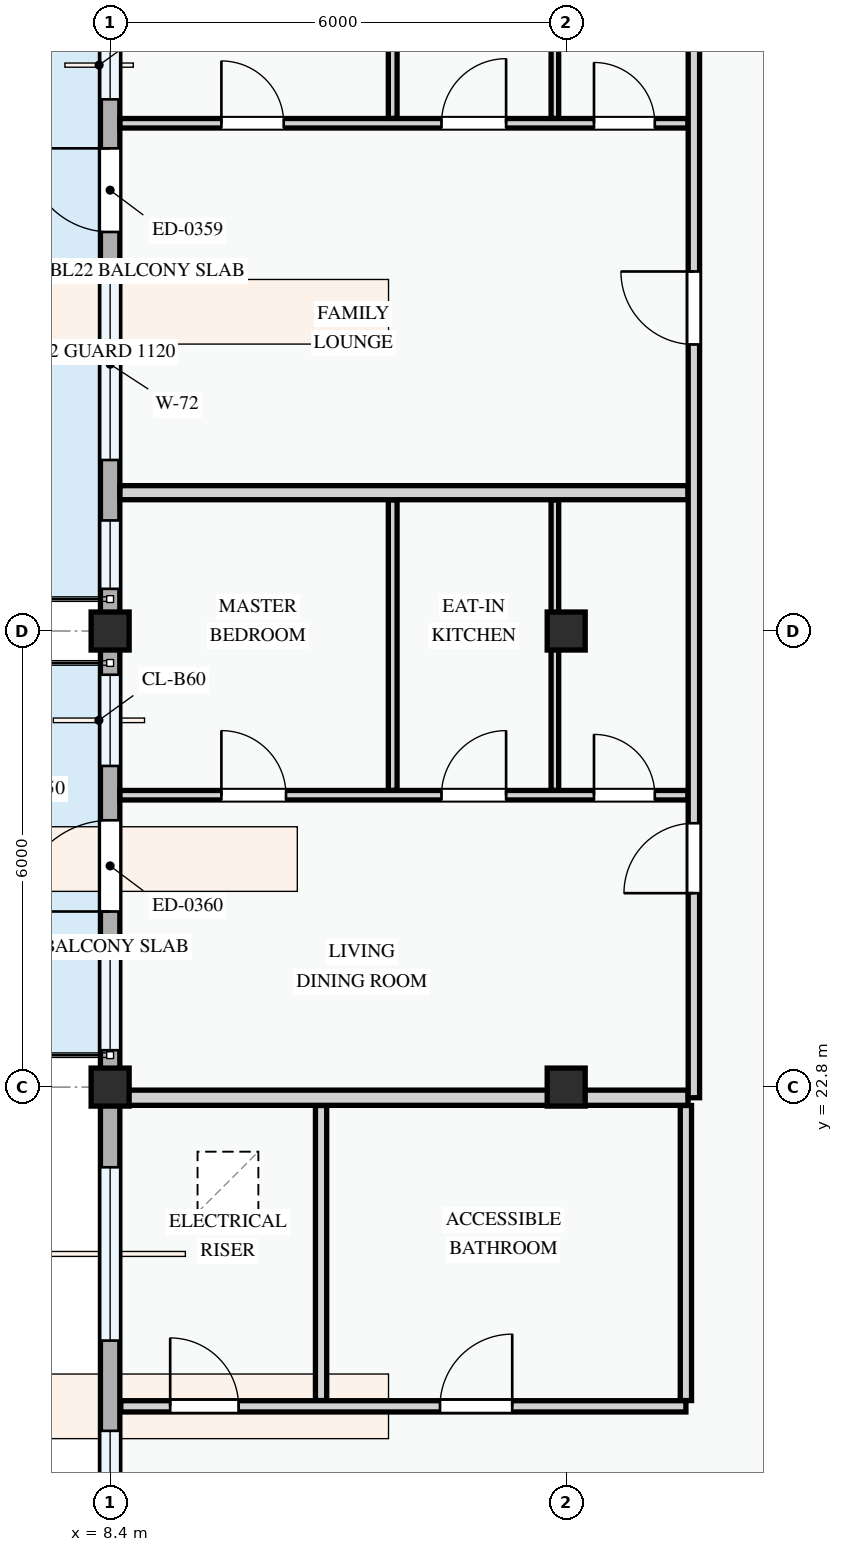
"""IFC4 building model, lengths in metres.
Left out: names, types, materials, properties, quantities, classifications, styles, units other than length and angle.
Written with IfcOpenShell. Run it as: python <this file> out.ifc"""

import sys

from ifc_helpers import new_model, si_unit, direction, frame, frame_2d, origin, origin_2d, place, context, subcontext, project, spatial, rectangle, extrude, element, fill, save


model = new_model("IFC4")
c1 = context("Model", 3, precision=1e-05, world=origin(), true_north=direction((0.0, 1.0)))
c2 = subcontext(c1, "Body", "Model", "MODEL_VIEW")
j1 = project(units=[si_unit("LENGTHUNIT", "METRE"), si_unit("PLANEANGLEUNIT", "RADIAN")], contexts=[c1])
p1 = place(None, origin())
s1 = spatial("IfcSite", under=j1, at=p1, CompositionType="ELEMENT")
p2 = place(p1, origin())
s2 = spatial("IfcBuilding", under=s1, at=p2, CompositionType="ELEMENT")
p3 = place(p2, frame((0.0, 0.0, 31.2)))
s3 = spatial("IfcBuildingStorey", under=s2, at=p3, CompositionType="ELEMENT", Elevation=31.2)
for number, where, z_axis, x_axis in (
    (1, (8.4, 22.8, 0.0), (0.0, 0.0, 1.0), (1.0, 0.0, 0.0)),
    (2, (8.4, 28.8, 0.0), (0.0, 0.0, 1.0), (1.0, 0.0, 0.0)),
    (3, (14.4, 22.8, 0.0), (0.0, 0.0, 1.0), (1.0, 0.0, 0.0)),
    (4, (14.4, 28.8, 0.0), (0.0, 0.0, 1.0), (1.0, 0.0, 0.0)),
):
    element("IfcColumn", number, at=place(p3, frame(where, z_axis=z_axis, x_axis=x_axis)), inside=s3, PredefinedType="COLUMN", context=c2, shape_type="SweptSolid", body=[
        extrude(rectangle(XDim=0.5, YDim=0.5, at=origin_2d()), origin(), (0.0, 0.0, 1.0), 3.3),
    ])
p4 = place(p3, frame((8.4, 37.2, 0.0), z_axis=(0.0, 0.0, 1.0), x_axis=(0.0, -1.0, 0.0)))
e5 = element("IfcWall", 5, at=p4, inside=s3, PredefinedType="STANDARD", context=c2, shape_type="SweptSolid", body=[
    extrude(rectangle(XDim=8.4, YDim=0.255, at=frame_2d((4.2, 0.0))), origin(), (0.0, 0.0, 1.0), 2.425),
])
p5 = place(p4, frame((2.05, 0.0, 0.0)))
e6 = element("IfcOpeningElement", 6, at=p5, cuts=e5, PredefinedType="OPENING", context=c2, shape_type="SweptSolid", body=[
    extrude(rectangle(XDim=1.1, YDim=2.15, at=frame_2d((0.55, 1.075))), frame((0.0, 0.137, 0.0), z_axis=(0.0, -1.0, 0.0), x_axis=(1.0, 0.0, 0.0)), (0.0, 0.0, 1.0), 0.275),
])
p6 = place(p4, frame((0.505, 0.0, 0.78)))
e7 = element("IfcOpeningElement", 7, at=p6, cuts=e5, PredefinedType="OPENING", context=c2, shape_type="SweptSolid", body=[
    extrude(rectangle(XDim=0.9, YDim=1.2, at=frame_2d((0.45, 0.6))), frame((0.0, 0.137, 0.0), z_axis=(0.0, -1.0, 0.0), x_axis=(1.0, 0.0, 0.0)), (0.0, 0.0, 1.0), 0.275),
])
p7 = place(p4, frame((3.63, 0.0, 0.78)))
e8 = element("IfcOpeningElement", 8, at=p7, cuts=e5, PredefinedType="OPENING", context=c2, shape_type="SweptSolid", body=[
    extrude(rectangle(XDim=2.52, YDim=1.5, at=frame_2d((1.26, 0.75))), frame((0.0, 0.137, 0.0), z_axis=(0.0, -1.0, 0.0), x_axis=(1.0, 0.0, 0.0)), (0.0, 0.0, 1.0), 0.275),
])
p8 = place(p4, frame((6.945, 0.0, 0.78)))
e9 = element("IfcOpeningElement", 9, at=p8, cuts=e5, PredefinedType="OPENING", context=c2, shape_type="SweptSolid", body=[
    extrude(rectangle(XDim=0.9, YDim=1.2, at=frame_2d((0.45, 0.6))), frame((0.0, 0.137, 0.0), z_axis=(0.0, -1.0, 0.0), x_axis=(1.0, 0.0, 0.0)), (0.0, 0.0, 1.0), 0.275),
])
p9 = place(p3, frame((8.4, 28.8, 0.0), z_axis=(0.0, 0.0, 1.0), x_axis=(0.0, -1.0, 0.0)))
e10 = element("IfcWall", 10, at=p9, inside=s3, PredefinedType="STANDARD", context=c2, shape_type="SweptSolid", body=[
    extrude(rectangle(XDim=6.0, YDim=0.255, at=frame_2d((3.0, 0.0))), origin(), (0.0, 0.0, 1.0), 2.575),
])
p10 = place(p9, frame((2.49, 0.0, 0.0)))
e11 = element("IfcOpeningElement", 11, at=p10, cuts=e10, PredefinedType="OPENING", context=c2, shape_type="SweptSolid", body=[
    extrude(rectangle(XDim=1.2, YDim=2.15, at=frame_2d((0.6, 1.075))), frame((0.0, 0.137, 0.0), z_axis=(0.0, -1.0, 0.0), x_axis=(1.0, 0.0, 0.0)), (0.0, 0.0, 1.0), 0.275),
])
p11 = place(p9, frame((0.575, 0.0, 0.78)))
e12 = element("IfcOpeningElement", 12, at=p11, cuts=e10, PredefinedType="OPENING", context=c2, shape_type="SweptSolid", body=[
    extrude(rectangle(XDim=1.2, YDim=1.35, at=frame_2d((0.6, 0.675))), frame((0.0, 0.137, 0.0), z_axis=(0.0, -1.0, 0.0), x_axis=(1.0, 0.0, 0.0)), (0.0, 0.0, 1.0), 0.275),
])
p12 = place(p9, frame((4.035, 0.0, 0.78)))
e13 = element("IfcOpeningElement", 13, at=p12, cuts=e10, PredefinedType="OPENING", context=c2, shape_type="SweptSolid", body=[
    extrude(rectangle(XDim=1.48, YDim=1.52, at=frame_2d((0.74, 0.76))), frame((0.0, 0.137, 0.0), z_axis=(0.0, -1.0, 0.0), x_axis=(1.0, 0.0, 0.0)), (0.0, 0.0, 1.0), 0.275),
])
p13 = place(p3, frame((8.4, 22.8, 0.0), z_axis=(0.0, 0.0, 1.0), x_axis=(0.0, -1.0, 0.0)))
e14 = element("IfcWall", 14, at=p13, inside=s3, PredefinedType="STANDARD", context=c2, shape_type="SweptSolid", body=[
    extrude(rectangle(XDim=8.4, YDim=0.255, at=frame_2d((4.2, 0.0))), origin(), (0.0, 0.0, 1.0), 2.425),
])
p14 = place(p13, frame((1.055, 0.0, 0.78)))
e15 = element("IfcOpeningElement", 15, at=p14, cuts=e14, PredefinedType="OPENING", context=c2, shape_type="SweptSolid", body=[
    extrude(rectangle(XDim=2.28, YDim=1.46, at=frame_2d((1.14, 0.73))), frame((0.0, 0.137, 0.0), z_axis=(0.0, -1.0, 0.0), x_axis=(1.0, 0.0, 0.0)), (0.0, 0.0, 1.0), 0.275),
])
p15 = place(p13, frame((4.522, 0.0, 0.78)))
e16 = element("IfcOpeningElement", 16, at=p15, cuts=e14, PredefinedType="OPENING", context=c2, shape_type="SweptSolid", body=[
    extrude(rectangle(XDim=2.28, YDim=1.46, at=frame_2d((1.14, 0.73))), frame((0.0, 0.137, 0.0), z_axis=(0.0, -1.0, 0.0), x_axis=(1.0, 0.0, 0.0)), (0.0, 0.0, 1.0), 0.275),
])
for number, where, z_axis, x_axis in (
    (17, (11.175, 18.676, 0.0), (0.0, 0.0, 1.0), (0.0, 1.0, 0.0)),
    (18, (15.975, 18.676, 0.0), (0.0, 0.0, 1.0), (0.0, 1.0, 0.0)),
):
    element("IfcWall", number, at=place(p3, frame(where, z_axis=z_axis, x_axis=x_axis)), inside=s3, PredefinedType="PARTITIONING", context=c2, shape_type="SweptSolid", body=[
        extrude(rectangle(XDim=3.882, YDim=0.148, at=frame_2d((1.941, 0.0))), origin(), (0.0, 0.0, 1.0), 3.0),
    ])
p16 = place(p3, frame((8.54, 18.6, 0.0), z_axis=(0.0, 0.0, 1.0), x_axis=(1.0, 0.0, 0.0)))
e19 = element("IfcWall", 19, at=p16, inside=s3, PredefinedType="PARTITIONING", context=c2, shape_type="SweptSolid", body=[
    extrude(rectangle(XDim=7.435, YDim=0.148, at=frame_2d((3.718, 0.0))), origin(), (0.0, 0.0, 1.0), 3.0),
])
p17 = place(p16, frame((0.65, 0.0, 0.0)))
e20 = element("IfcOpeningElement", 20, at=p17, cuts=e19, PredefinedType="OPENING", context=c2, shape_type="SweptSolid", body=[
    extrude(rectangle(XDim=0.9, YDim=2.1, at=frame_2d((0.45, 1.05))), frame((0.0, 0.084, 0.0), z_axis=(0.0, -1.0, 0.0), x_axis=(1.0, 0.0, 0.0)), (0.0, 0.0, 1.0), 0.168),
])
p18 = place(p16, frame((4.2, 0.0, 0.0)))
e21 = element("IfcOpeningElement", 21, at=p18, cuts=e19, PredefinedType="OPENING", context=c2, shape_type="SweptSolid", body=[
    extrude(rectangle(XDim=0.95, YDim=2.1, at=frame_2d((0.475, 1.05))), frame((0.0, 0.084, 0.0), z_axis=(0.0, -1.0, 0.0), x_axis=(1.0, 0.0, 0.0)), (0.0, 0.0, 1.0), 0.168),
])
p19 = place(p3, frame((8.53, 26.64, 0.0), z_axis=(0.0, 0.0, 1.0), x_axis=(1.0, 0.0, 0.0)))
e22 = element("IfcWall", 22, at=p19, inside=s3, PredefinedType="PARTITIONING", context=c2, shape_type="SweptSolid", body=[
    extrude(rectangle(XDim=7.473, YDim=0.125, at=frame_2d((3.737, 0.0))), origin(), (0.0, 0.0, 1.0), 3.0),
])
p20 = place(p19, frame((1.334, 0.0, 0.0)))
e23 = element("IfcOpeningElement", 23, at=p20, cuts=e22, PredefinedType="OPENING", context=c2, shape_type="SweptSolid", body=[
    extrude(rectangle(XDim=0.85, YDim=2.1, at=frame_2d((0.425, 1.05))), frame((0.0, 0.073, 0.0), z_axis=(0.0, -1.0, 0.0), x_axis=(1.0, 0.0, 0.0)), (0.0, 0.0, 1.0), 0.145),
])
p21 = place(p19, frame((4.23, 0.0, 0.0)))
e24 = element("IfcOpeningElement", 24, at=p21, cuts=e22, PredefinedType="OPENING", context=c2, shape_type="SweptSolid", body=[
    extrude(rectangle(XDim=0.85, YDim=2.1, at=frame_2d((0.425, 1.05))), frame((0.0, 0.073, 0.0), z_axis=(0.0, -1.0, 0.0), x_axis=(1.0, 0.0, 0.0)), (0.0, 0.0, 1.0), 0.145),
])
p22 = place(p19, frame((6.236, 0.0, 0.0)))
e25 = element("IfcOpeningElement", 25, at=p22, cuts=e22, PredefinedType="OPENING", context=c2, shape_type="SweptSolid", body=[
    extrude(rectangle(XDim=0.8, YDim=2.1, at=frame_2d((0.4, 1.05))), frame((0.0, 0.073, 0.0), z_axis=(0.0, -1.0, 0.0), x_axis=(1.0, 0.0, 0.0)), (0.0, 0.0, 1.0), 0.145),
])
p23 = place(p3, frame((12.118, 26.705, 0.0), z_axis=(0.0, 0.0, 1.0), x_axis=(0.0, 1.0, 0.0)))
e26 = element("IfcWall", 26, at=p23, inside=s3, PredefinedType="PARTITIONING", context=c2, shape_type="SweptSolid", body=[
    extrude(rectangle(XDim=3.821, YDim=0.115, at=frame_2d((1.91, 0.0))), origin(), (0.0, 0.0, 1.0), 3.0),
])
p24 = place(p3, frame((14.251, 26.705, 0.0), z_axis=(0.0, 0.0, 1.0), x_axis=(0.0, 1.0, 0.0)))
e27 = element("IfcWall", 27, at=p24, inside=s3, PredefinedType="PARTITIONING", context=c2, shape_type="SweptSolid", body=[
    extrude(rectangle(XDim=3.821, YDim=0.1, at=frame_2d((1.91, 0.0))), origin(), (0.0, 0.0, 1.0), 2.425),
])
p25 = place(p3, frame((8.53, 22.66, 0.0), z_axis=(0.0, 0.0, 1.0), x_axis=(1.0, 0.0, 0.0)))
e28 = element("IfcWall", 28, at=p25, inside=s3, PredefinedType="PARTITIONING", context=c2, shape_type="SweptSolid", body=[
    extrude(rectangle(XDim=7.473, YDim=0.2, at=frame_2d((3.737, 0.0))), origin(), (0.0, 0.0, 1.0), 2.375),
])
p26 = place(p3, frame((8.53, 35.48, 0.0), z_axis=(0.0, 0.0, 1.0), x_axis=(1.0, 0.0, 0.0)))
e29 = element("IfcWall", 29, at=p26, inside=s3, PredefinedType="PARTITIONING", context=c2, shape_type="SweptSolid", body=[
    extrude(rectangle(XDim=7.473, YDim=0.125, at=frame_2d((3.737, 0.0))), origin(), (0.0, 0.0, 1.0), 3.0),
])
p27 = place(p26, frame((1.334, 0.0, 0.0)))
e30 = element("IfcOpeningElement", 30, at=p27, cuts=e29, PredefinedType="OPENING", context=c2, shape_type="SweptSolid", body=[
    extrude(rectangle(XDim=0.82, YDim=2.08, at=frame_2d((0.41, 1.04))), frame((0.0, 0.073, 0.0), z_axis=(0.0, -1.0, 0.0), x_axis=(1.0, 0.0, 0.0)), (0.0, 0.0, 1.0), 0.145),
])
p28 = place(p26, frame((4.23, 0.0, 0.0)))
e31 = element("IfcOpeningElement", 31, at=p28, cuts=e29, PredefinedType="OPENING", context=c2, shape_type="SweptSolid", body=[
    extrude(rectangle(XDim=0.85, YDim=2.1, at=frame_2d((0.425, 1.05))), frame((0.0, 0.073, 0.0), z_axis=(0.0, -1.0, 0.0), x_axis=(1.0, 0.0, 0.0)), (0.0, 0.0, 1.0), 0.145),
])
p29 = place(p26, frame((6.236, 0.0, 0.0)))
e32 = element("IfcOpeningElement", 32, at=p29, cuts=e29, PredefinedType="OPENING", context=c2, shape_type="SweptSolid", body=[
    extrude(rectangle(XDim=0.8, YDim=2.1, at=frame_2d((0.4, 1.05))), frame((0.0, 0.073, 0.0), z_axis=(0.0, -1.0, 0.0), x_axis=(1.0, 0.0, 0.0)), (0.0, 0.0, 1.0), 0.145),
])
p30 = place(p3, frame((12.118, 35.544, 0.0), z_axis=(0.0, 0.0, 1.0), x_axis=(0.0, 1.0, 0.0)))
e33 = element("IfcWall", 33, at=p30, inside=s3, PredefinedType="PARTITIONING", context=c2, shape_type="SweptSolid", body=[
    extrude(rectangle(XDim=7.595, YDim=0.115, at=frame_2d((3.798, 0.0))), origin(), (0.0, 0.0, 1.0), 3.0),
])
p31 = place(p3, frame((14.251, 35.544, 0.0), z_axis=(0.0, 0.0, 1.0), x_axis=(0.0, 1.0, 0.0)))
e34 = element("IfcWall", 34, at=p31, inside=s3, PredefinedType="PARTITIONING", context=c2, shape_type="SweptSolid", body=[
    extrude(rectangle(XDim=7.526, YDim=0.1, at=frame_2d((3.763, 0.0))), origin(), (0.0, 0.0, 1.0), 2.425),
])
p32 = place(p3, frame((8.53, 30.62, 0.0), z_axis=(0.0, 0.0, 1.0), x_axis=(1.0, 0.0, 0.0)))
e35 = element("IfcWall", 35, at=p32, inside=s3, PredefinedType="PARTITIONING", context=c2, shape_type="SweptSolid", body=[
    extrude(rectangle(XDim=7.473, YDim=0.185, at=frame_2d((3.737, 0.0))), origin(), (0.0, 0.0, 1.0), 3.0),
])
p33 = place(p3, frame((16.08, 22.66, 0.0), z_axis=(0.0, 0.0, 1.0), x_axis=(0.0, 1.0, 0.0)))
e36 = element("IfcWall", 36, at=p33, inside=s3, PredefinedType="PARTITIONING", context=c2, shape_type="SweptSolid", body=[
    extrude(rectangle(XDim=20.411, YDim=0.15, at=frame_2d((10.205, 0.0))), origin(), (0.0, 0.0, 1.0), 3.0),
])
p34 = place(p33, frame((2.691, 0.0, 0.0)))
e37 = element("IfcOpeningElement", 37, at=p34, cuts=e36, PredefinedType="OPENING", context=c2, shape_type="SweptSolid", body=[
    extrude(rectangle(XDim=0.92, YDim=2.1, at=frame_2d((0.46, 1.05))), frame((0.0, 0.085, 0.0), z_axis=(0.0, -1.0, 0.0), x_axis=(1.0, 0.0, 0.0)), (0.0, 0.0, 1.0), 0.17),
])
p35 = place(p33, frame((9.91, 0.0, 0.0)))
e38 = element("IfcOpeningElement", 38, at=p35, cuts=e36, PredefinedType="OPENING", context=c2, shape_type="SweptSolid", body=[
    extrude(rectangle(XDim=0.96, YDim=2.12, at=frame_2d((0.48, 1.06))), frame((0.0, 0.085, 0.0), z_axis=(0.0, -1.0, 0.0), x_axis=(1.0, 0.0, 0.0)), (0.0, 0.0, 1.0), 0.17),
])
p36 = place(p5, frame((1.1, 0.0, 0.0), z_axis=(0.0, 0.0, 1.0), x_axis=(-1.0, 0.0, 0.0)))
e39 = element("IfcDoor", 39, at=p36, inside=s3, OperationType="SINGLE_SWING_RIGHT", PredefinedType="DOOR", context=c2, shape_type="SweptSolid", body=[
    extrude(rectangle(XDim=1.1, YDim=2.15, at=frame_2d((0.55, 1.075))), frame((0.0, 0.025, 0.0), z_axis=(0.0, -1.0, 0.0), x_axis=(1.0, 0.0, 0.0)), (0.0, 0.0, 1.0), 0.05),
])
fill(e6, e39)
p37 = place(p6, origin())
e40 = element("IfcWindow", 40, at=p37, inside=s3, PartitioningType="SINGLE_PANEL", PredefinedType="WINDOW", context=c2, shape_type="SweptSolid", body=[
    extrude(rectangle(XDim=0.9, YDim=1.2, at=frame_2d((0.45, 0.6))), frame((0.0, 0.03, 0.0), z_axis=(0.0, -1.0, 0.0), x_axis=(1.0, 0.0, 0.0)), (0.0, 0.0, 1.0), 0.06),
])
fill(e7, e40)
p38 = place(p7, origin())
e41 = element("IfcWindow", 41, at=p38, inside=s3, PartitioningType="DOUBLE_PANEL_VERTICAL", PredefinedType="WINDOW", context=c2, shape_type="SweptSolid", body=[
    extrude(rectangle(XDim=2.52, YDim=1.5, at=frame_2d((1.26, 0.75))), frame((0.0, 0.03, 0.0), z_axis=(0.0, -1.0, 0.0), x_axis=(1.0, 0.0, 0.0)), (0.0, 0.0, 1.0), 0.06),
])
fill(e8, e41)
p39 = place(p8, origin())
e42 = element("IfcWindow", 42, at=p39, inside=s3, PartitioningType="SINGLE_PANEL", PredefinedType="WINDOW", context=c2, shape_type="SweptSolid", body=[
    extrude(rectangle(XDim=0.9, YDim=1.2, at=frame_2d((0.45, 0.6))), frame((0.0, 0.03, 0.0), z_axis=(0.0, -1.0, 0.0), x_axis=(1.0, 0.0, 0.0)), (0.0, 0.0, 1.0), 0.06),
])
fill(e9, e42)
p40 = place(p10, frame((1.2, 0.0, 0.0), z_axis=(0.0, 0.0, 1.0), x_axis=(-1.0, 0.0, 0.0)))
e43 = element("IfcDoor", 43, at=p40, inside=s3, OperationType="SINGLE_SWING_LEFT", PredefinedType="DOOR", context=c2, shape_type="SweptSolid", body=[
    extrude(rectangle(XDim=1.2, YDim=2.15, at=frame_2d((0.6, 1.075))), frame((0.0, 0.025, 0.0), z_axis=(0.0, -1.0, 0.0), x_axis=(1.0, 0.0, 0.0)), (0.0, 0.0, 1.0), 0.05),
])
fill(e11, e43)
p41 = place(p11, origin())
e44 = element("IfcWindow", 44, at=p41, inside=s3, PartitioningType="SINGLE_PANEL", PredefinedType="WINDOW", context=c2, shape_type="SweptSolid", body=[
    extrude(rectangle(XDim=1.2, YDim=1.35, at=frame_2d((0.6, 0.675))), frame((0.0, 0.03, 0.0), z_axis=(0.0, -1.0, 0.0), x_axis=(1.0, 0.0, 0.0)), (0.0, 0.0, 1.0), 0.06),
])
fill(e12, e44)
p42 = place(p12, origin())
e45 = element("IfcWindow", 45, at=p42, inside=s3, PartitioningType="SINGLE_PANEL", PredefinedType="WINDOW", context=c2, shape_type="SweptSolid", body=[
    extrude(rectangle(XDim=1.48, YDim=1.52, at=frame_2d((0.74, 0.76))), frame((0.0, 0.03, 0.0), z_axis=(0.0, -1.0, 0.0), x_axis=(1.0, 0.0, 0.0)), (0.0, 0.0, 1.0), 0.06),
])
fill(e13, e45)
p43 = place(p14, origin())
e46 = element("IfcWindow", 46, at=p43, inside=s3, PartitioningType="DOUBLE_PANEL_VERTICAL", PredefinedType="WINDOW", context=c2, shape_type="SweptSolid", body=[
    extrude(rectangle(XDim=2.28, YDim=1.46, at=frame_2d((1.14, 0.73))), frame((0.0, 0.03, 0.0), z_axis=(0.0, -1.0, 0.0), x_axis=(1.0, 0.0, 0.0)), (0.0, 0.0, 1.0), 0.06),
])
fill(e15, e46)
p44 = place(p15, origin())
e47 = element("IfcWindow", 47, at=p44, inside=s3, PartitioningType="DOUBLE_PANEL_VERTICAL", PredefinedType="WINDOW", context=c2, shape_type="SweptSolid", body=[
    extrude(rectangle(XDim=2.28, YDim=1.46, at=frame_2d((1.14, 0.73))), frame((0.0, 0.03, 0.0), z_axis=(0.0, -1.0, 0.0), x_axis=(1.0, 0.0, 0.0)), (0.0, 0.0, 1.0), 0.06),
])
fill(e16, e47)
p45 = place(p17, origin())
e48 = element("IfcDoor", 48, at=p45, inside=s3, OperationType="SINGLE_SWING_LEFT", PredefinedType="DOOR", context=c2, shape_type="SweptSolid", body=[
    extrude(rectangle(XDim=0.9, YDim=2.1, at=frame_2d((0.45, 1.05))), frame((0.0, 0.025, 0.0), z_axis=(0.0, -1.0, 0.0), x_axis=(1.0, 0.0, 0.0)), (0.0, 0.0, 1.0), 0.05),
])
fill(e20, e48)
p46 = place(p18, origin())
e49 = element("IfcDoor", 49, at=p46, inside=s3, OperationType="SINGLE_SWING_RIGHT", PredefinedType="DOOR", context=c2, shape_type="SweptSolid", body=[
    extrude(rectangle(XDim=0.95, YDim=2.1, at=frame_2d((0.475, 1.05))), frame((0.0, 0.025, 0.0), z_axis=(0.0, -1.0, 0.0), x_axis=(1.0, 0.0, 0.0)), (0.0, 0.0, 1.0), 0.05),
])
fill(e21, e49)
p47 = place(p20, origin())
e50 = element("IfcDoor", 50, at=p47, inside=s3, OperationType="SINGLE_SWING_LEFT", PredefinedType="DOOR", context=c2, shape_type="SweptSolid", body=[
    extrude(rectangle(XDim=0.85, YDim=2.1, at=frame_2d((0.425, 1.05))), frame((0.0, 0.025, 0.0), z_axis=(0.0, -1.0, 0.0), x_axis=(1.0, 0.0, 0.0)), (0.0, 0.0, 1.0), 0.05),
])
fill(e23, e50)
p48 = place(p21, origin())
e51 = element("IfcDoor", 51, at=p48, inside=s3, OperationType="SINGLE_SWING_RIGHT", PredefinedType="DOOR", context=c2, shape_type="SweptSolid", body=[
    extrude(rectangle(XDim=0.85, YDim=2.1, at=frame_2d((0.425, 1.05))), frame((0.0, 0.025, 0.0), z_axis=(0.0, -1.0, 0.0), x_axis=(1.0, 0.0, 0.0)), (0.0, 0.0, 1.0), 0.05),
])
fill(e24, e51)
p49 = place(p22, origin())
e52 = element("IfcDoor", 52, at=p49, inside=s3, OperationType="SINGLE_SWING_LEFT", PredefinedType="DOOR", context=c2, shape_type="SweptSolid", body=[
    extrude(rectangle(XDim=0.8, YDim=2.1, at=frame_2d((0.4, 1.05))), frame((0.0, 0.025, 0.0), z_axis=(0.0, -1.0, 0.0), x_axis=(1.0, 0.0, 0.0)), (0.0, 0.0, 1.0), 0.05),
])
fill(e25, e52)
p50 = place(p27, origin())
e53 = element("IfcDoor", 53, at=p50, inside=s3, OperationType="SINGLE_SWING_LEFT", PredefinedType="DOOR", context=c2, shape_type="SweptSolid", body=[
    extrude(rectangle(XDim=0.82, YDim=2.08, at=frame_2d((0.41, 1.04))), frame((0.0, 0.025, 0.0), z_axis=(0.0, -1.0, 0.0), x_axis=(1.0, 0.0, 0.0)), (0.0, 0.0, 1.0), 0.05),
])
fill(e30, e53)
p51 = place(p28, origin())
e54 = element("IfcDoor", 54, at=p51, inside=s3, OperationType="SINGLE_SWING_RIGHT", PredefinedType="DOOR", context=c2, shape_type="SweptSolid", body=[
    extrude(rectangle(XDim=0.85, YDim=2.1, at=frame_2d((0.425, 1.05))), frame((0.0, 0.025, 0.0), z_axis=(0.0, -1.0, 0.0), x_axis=(1.0, 0.0, 0.0)), (0.0, 0.0, 1.0), 0.05),
])
fill(e31, e54)
p52 = place(p29, origin())
e55 = element("IfcDoor", 55, at=p52, inside=s3, OperationType="SINGLE_SWING_LEFT", PredefinedType="DOOR", context=c2, shape_type="SweptSolid", body=[
    extrude(rectangle(XDim=0.8, YDim=2.1, at=frame_2d((0.4, 1.05))), frame((0.0, 0.025, 0.0), z_axis=(0.0, -1.0, 0.0), x_axis=(1.0, 0.0, 0.0)), (0.0, 0.0, 1.0), 0.05),
])
fill(e32, e55)
p53 = place(p34, origin())
e56 = element("IfcDoor", 56, at=p53, inside=s3, OperationType="SINGLE_SWING_LEFT", PredefinedType="DOOR", context=c2, shape_type="SweptSolid", body=[
    extrude(rectangle(XDim=0.92, YDim=2.1, at=frame_2d((0.46, 1.05))), frame((0.0, 0.025, 0.0), z_axis=(0.0, -1.0, 0.0), x_axis=(1.0, 0.0, 0.0)), (0.0, 0.0, 1.0), 0.05),
])
fill(e37, e56)
p54 = place(p35, origin())
e57 = element("IfcDoor", 57, at=p54, inside=s3, OperationType="SINGLE_SWING_RIGHT", PredefinedType="DOOR", context=c2, shape_type="SweptSolid", body=[
    extrude(rectangle(XDim=0.96, YDim=2.12, at=frame_2d((0.48, 1.06))), frame((0.0, 0.025, 0.0), z_axis=(0.0, -1.0, 0.0), x_axis=(1.0, 0.0, 0.0)), (0.0, 0.0, 1.0), 0.05),
])
fill(e38, e57)
save(model, sys.argv[1])
